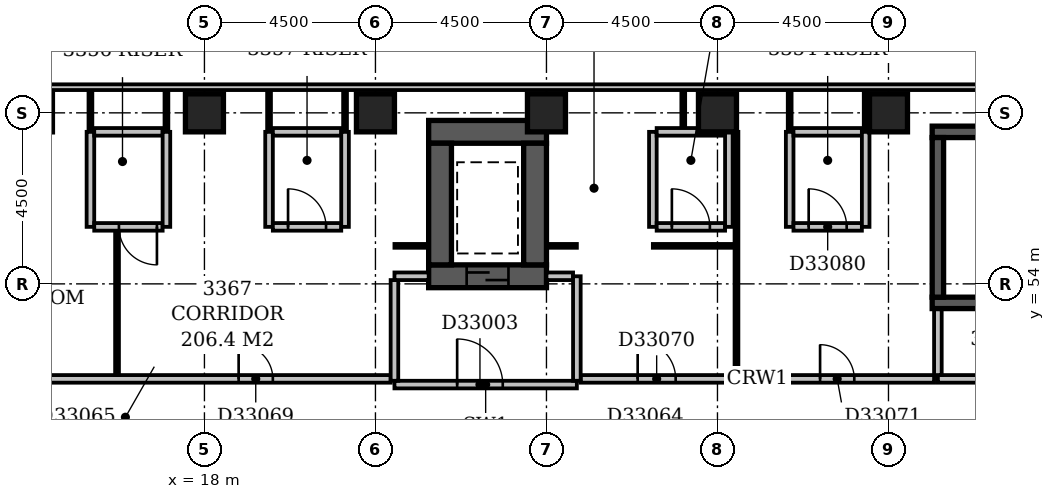
"""IFC4 building model, lengths in metres.
Left out: names, types, materials, properties, quantities, classifications, styles, units other than length and angle.
Written with IfcOpenShell. Run it as: python <this file> out.ifc"""

import sys

from ifc_helpers import new_model, si_unit, direction, frame, frame_2d, origin, origin_2d, place, context, subcontext, project, spatial, rectangle, extrude, element, fill, save


model = new_model("IFC4")
c1 = context("Model", 3, precision=1e-05, world=origin(), true_north=direction((0.0, 1.0)))
c2 = subcontext(c1, "Body", "Model", "MODEL_VIEW")
j1 = project(units=[si_unit("LENGTHUNIT", "METRE"), si_unit("PLANEANGLEUNIT", "RADIAN")], contexts=[c1])
p1 = place(None, origin())
s1 = spatial("IfcSite", under=j1, at=p1, CompositionType="ELEMENT")
p2 = place(p1, origin())
s2 = spatial("IfcBuilding", under=s1, at=p2, CompositionType="ELEMENT")
p3 = place(p2, frame((0.0, 0.0, 134.0)))
s3 = spatial("IfcBuildingStorey", under=s2, at=p3, CompositionType="ELEMENT", Elevation=134.0)
p4 = place(p3, frame((23.9, 54.2, -0.3), z_axis=(0.0, 0.0, 1.0), x_axis=(1.0, 0.0, 0.0)))
e1 = element("IfcWall", 1, at=p4, inside=s3, PredefinedType="SHEAR", context=c2, shape_type="SweptSolid", body=[
    extrude(rectangle(XDim=3.1, YDim=0.6, at=frame_2d((1.55, 0.0))), origin(), (0.0, 0.0, 1.0), 3.6),
])
p5 = place(p4, frame((1.0, 0.0, 0.3)))
e2 = element("IfcOpeningElement", 2, at=p5, cuts=e1, PredefinedType="OPENING", context=c2, shape_type="SweptSolid", body=[
    extrude(rectangle(XDim=1.1, YDim=2.1, at=frame_2d((0.55, 1.05))), frame((0.0, 0.312, 0.0), z_axis=(0.0, -1.0, 0.0), x_axis=(1.0, 0.0, 0.0)), (0.0, 0.0, 1.0), 0.624),
])
p6 = place(p3, frame((23.9, 58.0, -0.3), z_axis=(0.0, 0.0, 1.0), x_axis=(1.0, 0.0, 0.0)))
e3 = element("IfcWall", 3, at=p6, inside=s3, PredefinedType="SHEAR", context=c2, shape_type="SweptSolid", body=[
    extrude(rectangle(XDim=3.1, YDim=0.6, at=frame_2d((1.55, 0.0))), origin(), (0.0, 0.0, 1.0), 3.6),
])
for number, where, z_axis, x_axis in (
    (4, (24.2, 54.5, -0.3), (0.0, 0.0, 1.0), (0.0, 1.0, 0.0)),
    (5, (26.7, 54.5, -0.3), (0.0, 0.0, 1.0), (0.0, 1.0, 0.0)),
):
    element("IfcWall", number, at=place(p3, frame(where, z_axis=z_axis, x_axis=x_axis)), inside=s3, PredefinedType="SHEAR", context=c2, shape_type="SweptSolid", body=[
        extrude(rectangle(XDim=3.2, YDim=0.6, at=frame_2d((1.6, 0.0))), origin(), (0.0, 0.0, 1.0), 3.6),
    ])
p7 = place(p3, frame((37.15, 53.5, -0.3), z_axis=(0.0, 0.0, 1.0), x_axis=(1.0, 0.0, 0.0)))
e6 = element("IfcWall", 6, at=p7, inside=s3, PredefinedType="SHEAR", context=c2, shape_type="SweptSolid", body=[
    extrude(rectangle(XDim=7.0, YDim=0.3, at=frame_2d((3.5, 0.0))), origin(), (0.0, 0.0, 1.0), 3.6),
])
p8 = place(p7, frame((5.58, 0.0, 0.3)))
e7 = element("IfcOpeningElement", 7, at=p8, cuts=e6, PredefinedType="OPENING", context=c2, shape_type="SweptSolid", body=[
    extrude(rectangle(XDim=1.1, YDim=2.1, at=frame_2d((0.55, 1.05))), frame((0.0, 0.162, 0.0), z_axis=(0.0, -1.0, 0.0), x_axis=(1.0, 0.0, 0.0)), (0.0, 0.0, 1.0), 0.324),
])
p9 = place(p3, frame((37.15, 58.0, -0.3), z_axis=(0.0, 0.0, 1.0), x_axis=(1.0, 0.0, 0.0)))
e8 = element("IfcWall", 8, at=p9, inside=s3, PredefinedType="SHEAR", context=c2, shape_type="SweptSolid", body=[
    extrude(rectangle(XDim=7.35, YDim=0.3, at=frame_2d((3.675, 0.0))), origin(), (0.0, 0.0, 1.0), 3.6),
])
p10 = place(p3, frame((37.3, 53.65, -0.3), z_axis=(0.0, 0.0, 1.0), x_axis=(0.0, 1.0, 0.0)))
e9 = element("IfcWall", 9, at=p10, inside=s3, PredefinedType="SHEAR", context=c2, shape_type="SweptSolid", body=[
    extrude(rectangle(XDim=4.2, YDim=0.3, at=frame_2d((2.1, 0.0))), origin(), (0.0, 0.0, 1.0), 3.6),
])
for number, where, z_axis, x_axis in (
    (10, (18.0, 58.5, -0.3), (0.0, 0.0, 1.0), (1.0, 0.0, 0.0)),
    (11, (22.5, 58.5, -0.3), (0.0, 0.0, 1.0), (1.0, 0.0, 0.0)),
    (12, (27.0, 58.5, -0.3), (0.0, 0.0, 1.0), (1.0, 0.0, 0.0)),
    (13, (31.5, 58.5, -0.3), (0.0, 0.0, 1.0), (1.0, 0.0, 0.0)),
    (14, (36.0, 58.5, -0.3), (0.0, 0.0, 1.0), (1.0, 0.0, 0.0)),
):
    element("IfcColumn", number, at=place(p3, frame(where, z_axis=z_axis, x_axis=x_axis)), inside=s3, PredefinedType="COLUMN", context=c2, shape_type="SweptSolid", body=[
        extrude(rectangle(XDim=1.0, YDim=1.0, at=origin_2d()), origin(), (0.0, 0.0, 1.0), 3.6),
    ])
p11 = place(p3, frame((68.1, 59.175, 0.0), z_axis=(0.0, 0.0, 1.0), x_axis=(-1.0, 0.0, 0.0)))
e15 = element("IfcWall", 15, at=p11, inside=s3, PredefinedType="STANDARD", context=c2, shape_type="SweptSolid", body=[
    extrude(rectangle(XDim=68.85, YDim=0.15, at=frame_2d((34.425, 0.0))), origin(), (0.0, 0.0, 1.0), 2.7),
])
p12 = place(p3, frame((23.0, 51.35, 0.0), z_axis=(0.0, 0.0, 1.0), x_axis=(1.0, 0.0, 0.0)))
e16 = element("IfcWall", 16, at=p12, inside=s3, PredefinedType="PARTITIONING", context=c2, shape_type="SweptSolid", body=[
    extrude(rectangle(XDim=4.8, YDim=0.2, at=frame_2d((2.4, 0.0))), origin(), (0.0, 0.0, 1.0), 3.3),
])
p13 = place(p12, frame((1.65, 0.0, 0.0)))
e17 = element("IfcOpeningElement", 17, at=p13, cuts=e16, PredefinedType="OPENING", context=c2, shape_type="SweptSolid", body=[
    extrude(rectangle(XDim=1.2, YDim=2.1, at=frame_2d((0.6, 1.05))), frame((0.0, 0.112, 0.0), z_axis=(0.0, -1.0, 0.0), x_axis=(1.0, 0.0, 0.0)), (0.0, 0.0, 1.0), 0.224),
])
p14 = place(p3, frame((27.8, 51.45, 0.0), z_axis=(0.0, 0.0, 1.0), x_axis=(0.0, 1.0, 0.0)))
e18 = element("IfcWall", 18, at=p14, inside=s3, PredefinedType="PARTITIONING", context=c2, shape_type="SweptSolid", body=[
    extrude(rectangle(XDim=2.75, YDim=0.2, at=frame_2d((1.375, 0.0))), origin(), (0.0, 0.0, 1.0), 3.3),
])
p15 = place(p3, frame((23.0, 54.2, 0.0), z_axis=(0.0, 0.0, 1.0), x_axis=(1.0, 0.0, 0.0)))
e19 = element("IfcWall", 19, at=p15, inside=s3, PredefinedType="PARTITIONING", context=c2, shape_type="SweptSolid", body=[
    extrude(rectangle(XDim=0.9, YDim=0.2, at=frame_2d((0.45, 0.0))), origin(), (0.0, 0.0, 1.0), 3.3),
])
p16 = place(p3, frame((27.0, 54.2, 0.0), z_axis=(0.0, 0.0, 1.0), x_axis=(1.0, 0.0, 0.0)))
e20 = element("IfcWall", 20, at=p16, inside=s3, PredefinedType="PARTITIONING", context=c2, shape_type="SweptSolid", body=[
    extrude(rectangle(XDim=0.7, YDim=0.2, at=frame_2d((0.35, 0.0))), origin(), (0.0, 0.0, 1.0), 3.3),
])
p17 = place(p3, frame((23.0, 51.45, 0.0), z_axis=(0.0, 0.0, 1.0), x_axis=(0.0, 1.0, 0.0)))
e21 = element("IfcWall", 21, at=p17, inside=s3, PredefinedType="PARTITIONING", context=c2, shape_type="SweptSolid", body=[
    extrude(rectangle(XDim=2.65, YDim=0.2, at=frame_2d((1.325, 0.0))), origin(), (0.0, 0.0, 1.0), 3.3),
])
p18 = place(p3, frame((37.3, 51.5, 0.0), z_axis=(0.0, 0.0, 1.0), x_axis=(1.0, 0.0, 0.0)))
e22 = element("IfcWall", 22, at=p18, inside=s3, PredefinedType="PARTITIONING", context=c2, shape_type="SweptSolid", body=[
    extrude(rectangle(XDim=6.7, YDim=0.2, at=frame_2d((3.35, 0.0))), origin(), (0.0, 0.0, 1.0), 3.3),
])
p19 = place(p18, frame((2.75, 0.0, 0.0)))
e23 = element("IfcOpeningElement", 23, at=p19, cuts=e22, PredefinedType="OPENING", context=c2, shape_type="SweptSolid", body=[
    extrude(rectangle(XDim=1.2, YDim=2.1, at=frame_2d((0.6, 1.05))), frame((0.0, 0.112, 0.0), z_axis=(0.0, -1.0, 0.0), x_axis=(1.0, 0.0, 0.0)), (0.0, 0.0, 1.0), 0.224),
])
p20 = place(p3, frame((37.3, 51.6, 0.0), z_axis=(0.0, 0.0, 1.0), x_axis=(0.0, 1.0, 0.0)))
e24 = element("IfcWall", 24, at=p20, inside=s3, PredefinedType="PARTITIONING", context=c2, shape_type="SweptSolid", body=[
    extrude(rectangle(XDim=1.73, YDim=0.2, at=frame_2d((0.865, 0.0))), origin(), (0.0, 0.0, 1.0), 3.3),
])
p21 = place(p3, frame((7.6, 51.5, 0.0), z_axis=(0.0, 0.0, 1.0), x_axis=(1.0, 0.0, 0.0)))
e25 = element("IfcWall", 25, at=p21, inside=s3, PredefinedType="PARTITIONING", context=c2, shape_type="SweptSolid", body=[
    extrude(rectangle(XDim=15.3, YDim=0.2, at=frame_2d((7.65, 0.0))), origin(), (0.0, 0.0, 1.0), 3.3),
])
p22 = place(p21, frame((3.55, 0.0, 0.0)))
e26 = element("IfcOpeningElement", 26, at=p22, cuts=e25, PredefinedType="OPENING", context=c2, shape_type="SweptSolid", body=[
    extrude(rectangle(XDim=0.9, YDim=2.1, at=frame_2d((0.45, 1.05))), frame((0.0, 0.112, 0.0), z_axis=(0.0, -1.0, 0.0), x_axis=(1.0, 0.0, 0.0)), (0.0, 0.0, 1.0), 0.224),
])
p23 = place(p21, frame((11.3, 0.0, 0.0)))
e27 = element("IfcOpeningElement", 27, at=p23, cuts=e25, PredefinedType="OPENING", context=c2, shape_type="SweptSolid", body=[
    extrude(rectangle(XDim=0.9, YDim=2.1, at=frame_2d((0.45, 1.05))), frame((0.0, 0.112, 0.0), z_axis=(0.0, -1.0, 0.0), x_axis=(1.0, 0.0, 0.0)), (0.0, 0.0, 1.0), 0.224),
])
p24 = place(p3, frame((27.9, 51.5, 0.0), z_axis=(0.0, 0.0, 1.0), x_axis=(1.0, 0.0, 0.0)))
e28 = element("IfcWall", 28, at=p24, inside=s3, PredefinedType="PARTITIONING", context=c2, shape_type="SweptSolid", body=[
    extrude(rectangle(XDim=9.3, YDim=0.2, at=frame_2d((4.65, 0.0))), origin(), (0.0, 0.0, 1.0), 3.3),
])
p25 = place(p24, frame((1.5, 0.0, 0.0)))
e29 = element("IfcOpeningElement", 29, at=p25, cuts=e28, PredefinedType="OPENING", context=c2, shape_type="SweptSolid", body=[
    extrude(rectangle(XDim=1.0, YDim=2.1, at=frame_2d((0.5, 1.05))), frame((0.0, 0.112, 0.0), z_axis=(0.0, -1.0, 0.0), x_axis=(1.0, 0.0, 0.0)), (0.0, 0.0, 1.0), 0.224),
])
p26 = place(p24, frame((6.3, 0.0, 0.0)))
e30 = element("IfcOpeningElement", 30, at=p26, cuts=e28, PredefinedType="OPENING", context=c2, shape_type="SweptSolid", body=[
    extrude(rectangle(XDim=0.9, YDim=2.1, at=frame_2d((0.45, 1.05))), frame((0.0, 0.112, 0.0), z_axis=(0.0, -1.0, 0.0), x_axis=(1.0, 0.0, 0.0)), (0.0, 0.0, 1.0), 0.224),
])
p27 = place(p3, frame((15.7, 51.6, 0.0), z_axis=(0.0, 0.0, 1.0), x_axis=(0.0, 1.0, 0.0)))
e31 = element("IfcWall", 31, at=p27, inside=s3, PredefinedType="PARTITIONING", context=c2, shape_type="SweptSolid", body=[
    extrude(rectangle(XDim=3.8, YDim=0.1, at=frame_2d((1.9, 0.0))), origin(), (0.0, 0.0, 1.0), 3.3),
])
p28 = place(p3, frame((32.0, 51.6, 0.0), z_axis=(0.0, 0.0, 1.0), x_axis=(0.0, 1.0, 0.0)))
e32 = element("IfcWall", 32, at=p28, inside=s3, PredefinedType="PARTITIONING", context=c2, shape_type="SweptSolid", body=[
    extrude(rectangle(XDim=6.4, YDim=0.1, at=frame_2d((3.2, 0.0))), origin(), (0.0, 0.0, 1.0), 3.3),
])
p29 = place(p3, frame((23.0, 55.0, 0.0), z_axis=(0.0, 0.0, 1.0), x_axis=(1.0, 0.0, 0.0)))
e33 = element("IfcWall", 33, at=p29, inside=s3, PredefinedType="PARTITIONING", context=c2, shape_type="SweptSolid", body=[
    extrude(rectangle(XDim=0.9, YDim=0.1, at=frame_2d((0.45, 0.0))), origin(), (0.0, 0.0, 1.0), 3.3),
])
p30 = place(p3, frame((27.0, 55.0, 0.0), z_axis=(0.0, 0.0, 1.0), x_axis=(1.0, 0.0, 0.0)))
e34 = element("IfcWall", 34, at=p30, inside=s3, PredefinedType="PARTITIONING", context=c2, shape_type="SweptSolid", body=[
    extrude(rectangle(XDim=0.8, YDim=0.1, at=frame_2d((0.4, 0.0))), origin(), (0.0, 0.0, 1.0), 3.3),
])
p31 = place(p3, frame((29.8, 55.0, 0.0), z_axis=(0.0, 0.0, 1.0), x_axis=(1.0, 0.0, 0.0)))
e35 = element("IfcWall", 35, at=p31, inside=s3, PredefinedType="PARTITIONING", context=c2, shape_type="SweptSolid", body=[
    extrude(rectangle(XDim=2.15, YDim=0.1, at=frame_2d((1.075, 0.0))), origin(), (0.0, 0.0, 1.0), 3.3),
])
p32 = place(p3, frame((15.0, 55.5, 0.0), z_axis=(0.0, 0.0, 1.0), x_axis=(0.0, 1.0, 0.0)))
e36 = element("IfcWall", 36, at=p32, inside=s3, PredefinedType="PARTITIONING", context=c2, shape_type="SweptSolid", body=[
    extrude(rectangle(XDim=2.5, YDim=0.2, at=frame_2d((1.25, 0.0))), origin(), (0.0, 0.0, 1.0), 3.3),
])
p33 = place(p3, frame((15.1, 55.5, 0.0), z_axis=(0.0, 0.0, 1.0), x_axis=(1.0, 0.0, 0.0)))
e37 = element("IfcWall", 37, at=p33, inside=s3, PredefinedType="PARTITIONING", context=c2, shape_type="SweptSolid", body=[
    extrude(rectangle(XDim=1.8, YDim=0.2, at=frame_2d((0.9, 0.0))), origin(), (0.0, 0.0, 1.0), 3.3),
])
p34 = place(p33, frame((0.65, 0.0, 0.0)))
e38 = element("IfcOpeningElement", 38, at=p34, cuts=e37, PredefinedType="OPENING", context=c2, shape_type="SweptSolid", body=[
    extrude(rectangle(XDim=1.0, YDim=2.1, at=frame_2d((0.5, 1.05))), frame((0.0, 0.112, 0.0), z_axis=(0.0, -1.0, 0.0), x_axis=(1.0, 0.0, 0.0)), (0.0, 0.0, 1.0), 0.224),
])
for number, where, z_axis, x_axis in (
    (39, (17.0, 55.5, 0.0), (0.0, 0.0, 1.0), (0.0, 1.0, 0.0)),
    (40, (19.7, 55.5, 0.0), (0.0, 0.0, 1.0), (0.0, 1.0, 0.0)),
):
    element("IfcWall", number, at=place(p3, frame(where, z_axis=z_axis, x_axis=x_axis)), inside=s3, PredefinedType="PARTITIONING", context=c2, shape_type="SweptSolid", body=[
        extrude(rectangle(XDim=2.5, YDim=0.2, at=frame_2d((1.25, 0.0))), origin(), (0.0, 0.0, 1.0), 3.3),
    ])
p35 = place(p3, frame((19.8, 55.5, 0.0), z_axis=(0.0, 0.0, 1.0), x_axis=(1.0, 0.0, 0.0)))
e41 = element("IfcWall", 41, at=p35, inside=s3, PredefinedType="PARTITIONING", context=c2, shape_type="SweptSolid", body=[
    extrude(rectangle(XDim=1.8, YDim=0.2, at=frame_2d((0.9, 0.0))), origin(), (0.0, 0.0, 1.0), 3.3),
])
p36 = place(p35, frame((0.4, 0.0, 0.0)))
e42 = element("IfcOpeningElement", 42, at=p36, cuts=e41, PredefinedType="OPENING", context=c2, shape_type="SweptSolid", body=[
    extrude(rectangle(XDim=1.0, YDim=2.1, at=frame_2d((0.5, 1.05))), frame((0.0, 0.112, 0.0), z_axis=(0.0, -1.0, 0.0), x_axis=(1.0, 0.0, 0.0)), (0.0, 0.0, 1.0), 0.224),
])
for number, where, z_axis, x_axis in (
    (43, (21.7, 55.5, 0.0), (0.0, 0.0, 1.0), (0.0, 1.0, 0.0)),
    (44, (29.8, 55.5, 0.0), (0.0, 0.0, 1.0), (0.0, 1.0, 0.0)),
):
    element("IfcWall", number, at=place(p3, frame(where, z_axis=z_axis, x_axis=x_axis)), inside=s3, PredefinedType="PARTITIONING", context=c2, shape_type="SweptSolid", body=[
        extrude(rectangle(XDim=2.5, YDim=0.2, at=frame_2d((1.25, 0.0))), origin(), (0.0, 0.0, 1.0), 3.3),
    ])
p37 = place(p3, frame((29.9, 55.5, 0.0), z_axis=(0.0, 0.0, 1.0), x_axis=(1.0, 0.0, 0.0)))
e45 = element("IfcWall", 45, at=p37, inside=s3, PredefinedType="PARTITIONING", context=c2, shape_type="SweptSolid", body=[
    extrude(rectangle(XDim=1.8, YDim=0.2, at=frame_2d((0.9, 0.0))), origin(), (0.0, 0.0, 1.0), 3.3),
])
p38 = place(p37, frame((0.4, 0.0, 0.0)))
e46 = element("IfcOpeningElement", 46, at=p38, cuts=e45, PredefinedType="OPENING", context=c2, shape_type="SweptSolid", body=[
    extrude(rectangle(XDim=1.0, YDim=2.1, at=frame_2d((0.5, 1.05))), frame((0.0, 0.112, 0.0), z_axis=(0.0, -1.0, 0.0), x_axis=(1.0, 0.0, 0.0)), (0.0, 0.0, 1.0), 0.224),
])
for number, where, z_axis, x_axis in (
    (47, (31.8, 55.5, 0.0), (0.0, 0.0, 1.0), (0.0, 1.0, 0.0)),
    (48, (33.4, 55.5, 0.0), (0.0, 0.0, 1.0), (0.0, 1.0, 0.0)),
):
    element("IfcWall", number, at=place(p3, frame(where, z_axis=z_axis, x_axis=x_axis)), inside=s3, PredefinedType="PARTITIONING", context=c2, shape_type="SweptSolid", body=[
        extrude(rectangle(XDim=2.5, YDim=0.2, at=frame_2d((1.25, 0.0))), origin(), (0.0, 0.0, 1.0), 3.3),
    ])
p39 = place(p3, frame((33.5, 55.5, 0.0), z_axis=(0.0, 0.0, 1.0), x_axis=(1.0, 0.0, 0.0)))
e49 = element("IfcWall", 49, at=p39, inside=s3, PredefinedType="PARTITIONING", context=c2, shape_type="SweptSolid", body=[
    extrude(rectangle(XDim=1.8, YDim=0.2, at=frame_2d((0.9, 0.0))), origin(), (0.0, 0.0, 1.0), 3.3),
])
p40 = place(p39, frame((0.4, 0.0, 0.0)))
e50 = element("IfcOpeningElement", 50, at=p40, cuts=e49, PredefinedType="OPENING", context=c2, shape_type="SweptSolid", body=[
    extrude(rectangle(XDim=1.0, YDim=2.1, at=frame_2d((0.5, 1.05))), frame((0.0, 0.112, 0.0), z_axis=(0.0, -1.0, 0.0), x_axis=(1.0, 0.0, 0.0)), (0.0, 0.0, 1.0), 0.224),
])
p41 = place(p3, frame((35.4, 55.5, 0.0), z_axis=(0.0, 0.0, 1.0), x_axis=(0.0, 1.0, 0.0)))
e51 = element("IfcWall", 51, at=p41, inside=s3, PredefinedType="PARTITIONING", context=c2, shape_type="SweptSolid", body=[
    extrude(rectangle(XDim=2.5, YDim=0.2, at=frame_2d((1.25, 0.0))), origin(), (0.0, 0.0, 1.0), 2.4),
])
p42 = place(p3, frame((15.0, 58.0, 0.0), z_axis=(0.0, 0.0, 1.0), x_axis=(0.0, 1.0, 0.0)))
e52 = element("IfcWall", 52, at=p42, inside=s3, PredefinedType="PARTITIONING", context=c2, shape_type="SweptSolid", body=[
    extrude(rectangle(XDim=1.1, YDim=0.1, at=frame_2d((0.55, 0.0))), origin(), (0.0, 0.0, 1.0), 3.3),
])
p43 = place(p3, frame((15.1, 58.0, 0.0), z_axis=(0.0, 0.0, 1.0), x_axis=(1.0, 0.0, 0.0)))
e53 = element("IfcWall", 53, at=p43, inside=s3, PredefinedType="PARTITIONING", context=c2, shape_type="SweptSolid", body=[
    extrude(rectangle(XDim=1.8, YDim=0.2, at=frame_2d((0.9, 0.0))), origin(), (0.0, 0.0, 1.0), 3.3),
])
for number, where, z_axis, x_axis in (
    (54, (17.0, 58.0, 0.0), (0.0, 0.0, 1.0), (0.0, 1.0, 0.0)),
    (55, (19.7, 58.0, 0.0), (0.0, 0.0, 1.0), (0.0, 1.0, 0.0)),
):
    element("IfcWall", number, at=place(p3, frame(where, z_axis=z_axis, x_axis=x_axis)), inside=s3, PredefinedType="PARTITIONING", context=c2, shape_type="SweptSolid", body=[
        extrude(rectangle(XDim=1.1, YDim=0.1, at=frame_2d((0.55, 0.0))), origin(), (0.0, 0.0, 1.0), 3.3),
    ])
p44 = place(p3, frame((19.8, 58.0, 0.0), z_axis=(0.0, 0.0, 1.0), x_axis=(1.0, 0.0, 0.0)))
e56 = element("IfcWall", 56, at=p44, inside=s3, PredefinedType="PARTITIONING", context=c2, shape_type="SweptSolid", body=[
    extrude(rectangle(XDim=1.8, YDim=0.2, at=frame_2d((0.9, 0.0))), origin(), (0.0, 0.0, 1.0), 3.3),
])
p45 = place(p3, frame((21.7, 58.0, 0.0), z_axis=(0.0, 0.0, 1.0), x_axis=(0.0, 1.0, 0.0)))
e57 = element("IfcWall", 57, at=p45, inside=s3, PredefinedType="PARTITIONING", context=c2, shape_type="SweptSolid", body=[
    extrude(rectangle(XDim=1.1, YDim=0.1, at=frame_2d((0.55, 0.0))), origin(), (0.0, 0.0, 1.0), 3.3),
])
p46 = place(p3, frame((29.9, 58.0, 0.0), z_axis=(0.0, 0.0, 1.0), x_axis=(1.0, 0.0, 0.0)))
e58 = element("IfcWall", 58, at=p46, inside=s3, PredefinedType="PARTITIONING", context=c2, shape_type="SweptSolid", body=[
    extrude(rectangle(XDim=1.8, YDim=0.2, at=frame_2d((0.9, 0.0))), origin(), (0.0, 0.0, 1.0), 3.3),
])
p47 = place(p3, frame((33.4, 58.0, 0.0), z_axis=(0.0, 0.0, 1.0), x_axis=(0.0, 1.0, 0.0)))
e59 = element("IfcWall", 59, at=p47, inside=s3, PredefinedType="PARTITIONING", context=c2, shape_type="SweptSolid", body=[
    extrude(rectangle(XDim=1.1, YDim=0.1, at=frame_2d((0.55, 0.0))), origin(), (0.0, 0.0, 1.0), 3.3),
])
p48 = place(p3, frame((33.5, 58.0, 0.0), z_axis=(0.0, 0.0, 1.0), x_axis=(1.0, 0.0, 0.0)))
e60 = element("IfcWall", 60, at=p48, inside=s3, PredefinedType="PARTITIONING", context=c2, shape_type="SweptSolid", body=[
    extrude(rectangle(XDim=1.8, YDim=0.2, at=frame_2d((0.9, 0.0))), origin(), (0.0, 0.0, 1.0), 3.3),
])
p49 = place(p3, frame((35.4, 58.0, 0.0), z_axis=(0.0, 0.0, 1.0), x_axis=(0.0, 1.0, 0.0)))
e61 = element("IfcWall", 61, at=p49, inside=s3, PredefinedType="PARTITIONING", context=c2, shape_type="SweptSolid", body=[
    extrude(rectangle(XDim=1.1, YDim=0.1, at=frame_2d((0.55, 0.0))), origin(), (0.0, 0.0, 1.0), 2.4),
])
p50 = place(p3, frame((30.6, 58.1, 0.0), z_axis=(0.0, 0.0, 1.0), x_axis=(0.0, 1.0, 0.0)))
e62 = element("IfcWall", 62, at=p50, inside=s3, PredefinedType="PARTITIONING", context=c2, shape_type="SweptSolid", body=[
    extrude(rectangle(XDim=1.0, YDim=0.1, at=frame_2d((0.5, 0.0))), origin(), (0.0, 0.0, 1.0), 3.3),
])
p51 = place(p13, origin())
e63 = element("IfcDoor", 63, at=p51, inside=s3, OperationType="SINGLE_SWING_LEFT", PredefinedType="DOOR", context=c2, shape_type="SweptSolid", body=[
    extrude(rectangle(XDim=1.2, YDim=2.1, at=frame_2d((0.6, 1.05))), frame((0.0, 0.025, 0.0), z_axis=(0.0, -1.0, 0.0), x_axis=(1.0, 0.0, 0.0)), (0.0, 0.0, 1.0), 0.05),
])
fill(e17, e63)
p52 = place(p5, origin())
e64 = element("IfcDoor", 64, at=p52, inside=s3, OperationType="SLIDING_TO_LEFT", PredefinedType="DOOR", context=c2, shape_type="SweptSolid", body=[
    extrude(rectangle(XDim=1.1, YDim=2.1, at=frame_2d((0.55, 1.05))), frame((0.0, 0.025, 0.0), z_axis=(0.0, -1.0, 0.0), x_axis=(1.0, 0.0, 0.0)), (0.0, 0.0, 1.0), 0.05),
])
fill(e2, e64)
p53 = place(p23, origin())
e65 = element("IfcDoor", 65, at=p53, inside=s3, OperationType="SINGLE_SWING_LEFT", PredefinedType="DOOR", context=c2, shape_type="SweptSolid", body=[
    extrude(rectangle(XDim=0.9, YDim=2.1, at=frame_2d((0.45, 1.05))), frame((0.0, 0.025, 0.0), z_axis=(0.0, -1.0, 0.0), x_axis=(1.0, 0.0, 0.0)), (0.0, 0.0, 1.0), 0.05),
])
fill(e27, e65)
p54 = place(p25, origin())
e66 = element("IfcDoor", 66, at=p54, inside=s3, OperationType="SINGLE_SWING_LEFT", PredefinedType="DOOR", context=c2, shape_type="SweptSolid", body=[
    extrude(rectangle(XDim=1.0, YDim=2.1, at=frame_2d((0.5, 1.05))), frame((0.0, 0.025, 0.0), z_axis=(0.0, -1.0, 0.0), x_axis=(1.0, 0.0, 0.0)), (0.0, 0.0, 1.0), 0.05),
])
fill(e29, e66)
p55 = place(p26, origin())
e67 = element("IfcDoor", 67, at=p55, inside=s3, OperationType="SINGLE_SWING_LEFT", PredefinedType="DOOR", context=c2, shape_type="SweptSolid", body=[
    extrude(rectangle(XDim=0.9, YDim=2.1, at=frame_2d((0.45, 1.05))), frame((0.0, 0.025, 0.0), z_axis=(0.0, -1.0, 0.0), x_axis=(1.0, 0.0, 0.0)), (0.0, 0.0, 1.0), 0.05),
])
fill(e30, e67)
p56 = place(p34, origin())
e68 = element("IfcDoor", 68, at=p56, inside=s3, OperationType="SINGLE_SWING_RIGHT", PredefinedType="DOOR", context=c2, shape_type="SweptSolid", body=[
    extrude(rectangle(XDim=1.0, YDim=2.1, at=frame_2d((0.5, 1.05))), frame((0.0, 0.025, 0.0), z_axis=(0.0, -1.0, 0.0), x_axis=(1.0, 0.0, 0.0)), (0.0, 0.0, 1.0), 0.05),
])
fill(e38, e68)
p57 = place(p36, origin())
e69 = element("IfcDoor", 69, at=p57, inside=s3, OperationType="SINGLE_SWING_LEFT", PredefinedType="DOOR", context=c2, shape_type="SweptSolid", body=[
    extrude(rectangle(XDim=1.0, YDim=2.1, at=frame_2d((0.5, 1.05))), frame((0.0, 0.025, 0.0), z_axis=(0.0, -1.0, 0.0), x_axis=(1.0, 0.0, 0.0)), (0.0, 0.0, 1.0), 0.05),
])
fill(e42, e69)
p58 = place(p38, origin())
e70 = element("IfcDoor", 70, at=p58, inside=s3, OperationType="SINGLE_SWING_LEFT", PredefinedType="DOOR", context=c2, shape_type="SweptSolid", body=[
    extrude(rectangle(XDim=1.0, YDim=2.1, at=frame_2d((0.5, 1.05))), frame((0.0, 0.025, 0.0), z_axis=(0.0, -1.0, 0.0), x_axis=(1.0, 0.0, 0.0)), (0.0, 0.0, 1.0), 0.05),
])
fill(e46, e70)
p59 = place(p40, origin())
e71 = element("IfcDoor", 71, at=p59, inside=s3, OperationType="SINGLE_SWING_LEFT", PredefinedType="DOOR", context=c2, shape_type="SweptSolid", body=[
    extrude(rectangle(XDim=1.0, YDim=2.1, at=frame_2d((0.5, 1.05))), frame((0.0, 0.025, 0.0), z_axis=(0.0, -1.0, 0.0), x_axis=(1.0, 0.0, 0.0)), (0.0, 0.0, 1.0), 0.05),
])
fill(e50, e71)
save(model, sys.argv[1])
